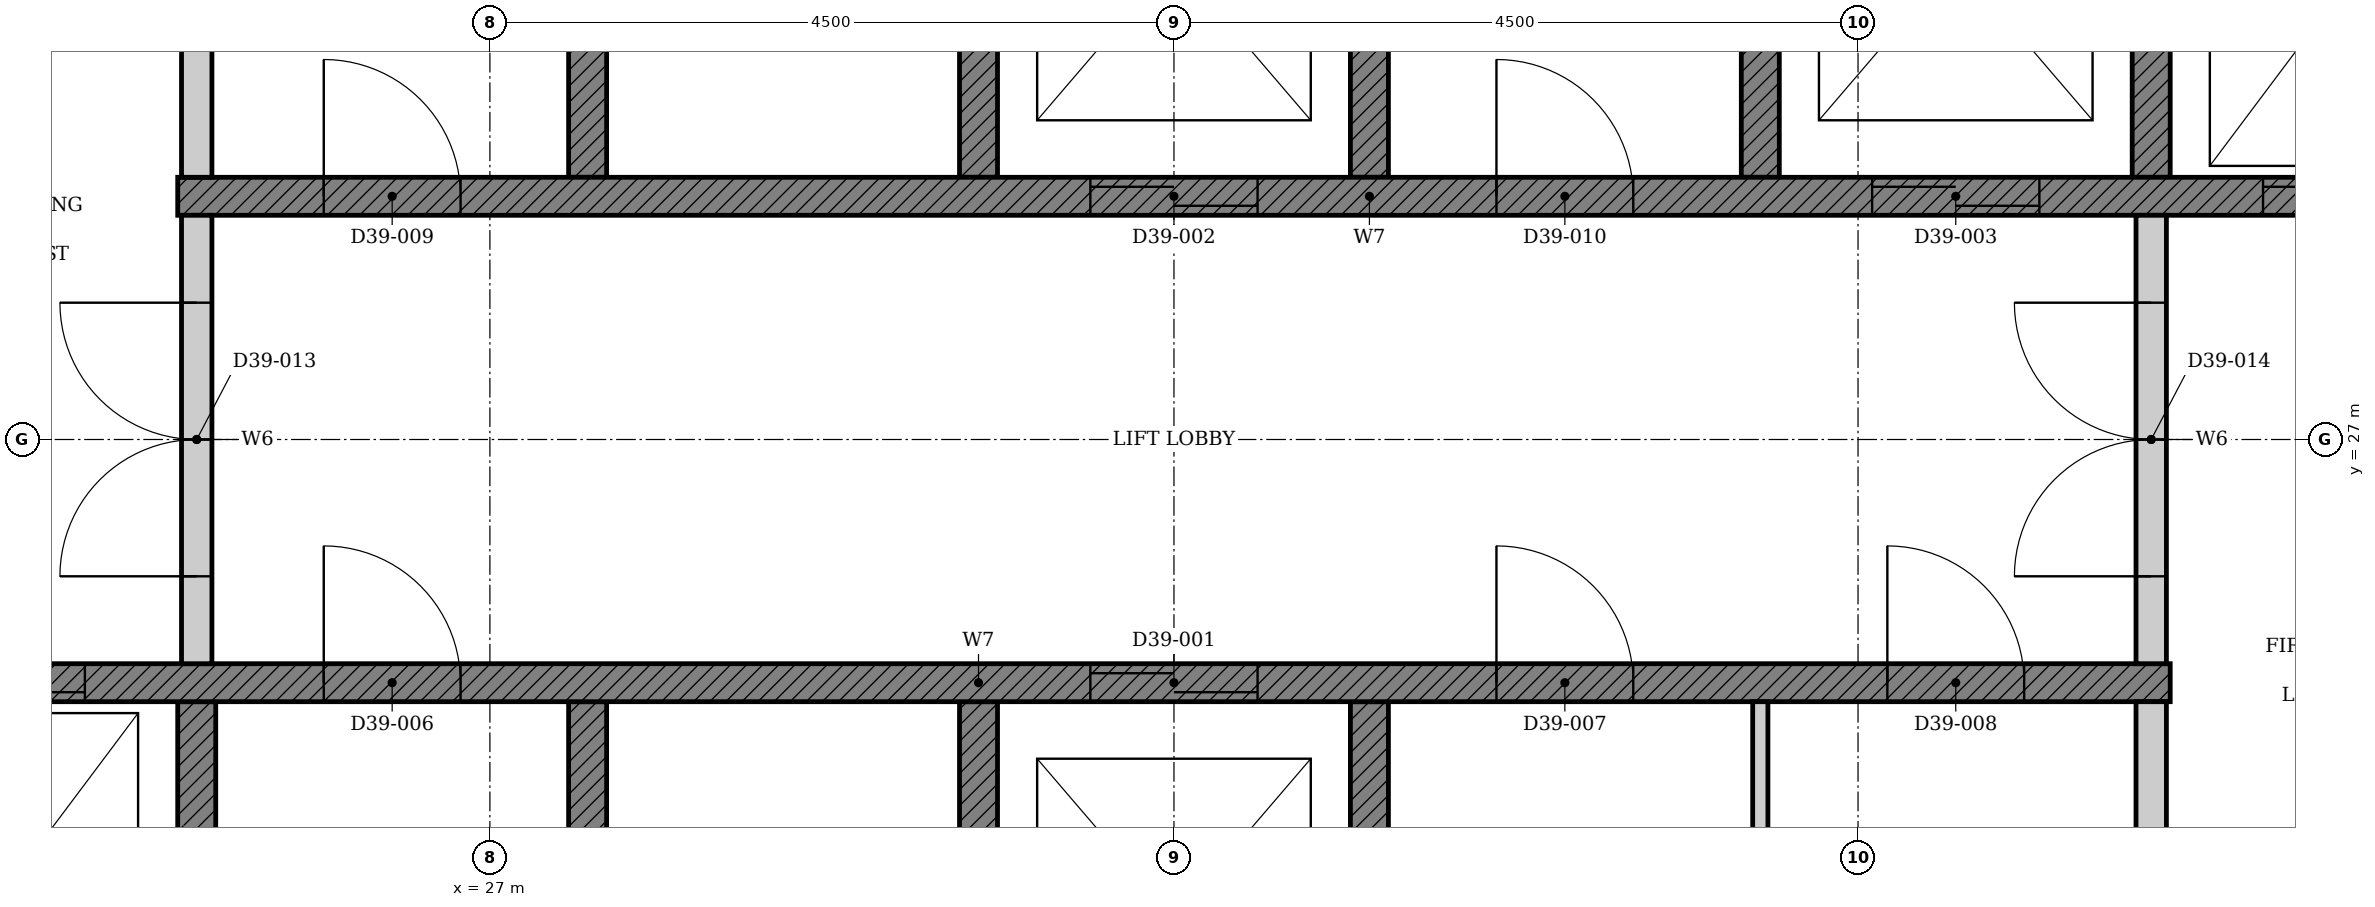
"""IFC4 building model, lengths in metres.
Left out: names, types, materials, properties, quantities, classifications, styles, units other than length and angle.
Written with IfcOpenShell. Run it as: python <this file> out.ifc"""

import sys

from ifc_helpers import new_model, si_unit, direction, frame, frame_2d, origin, place, context, subcontext, project, spatial, polyline, rectangle, outline, extrude, element, fill, save


model = new_model("IFC4")
c1 = context("Model", 3, precision=1e-05, world=origin(), true_north=direction((0.0, 1.0)))
c2 = subcontext(c1, "Body", "Model", "MODEL_VIEW")
j1 = project(units=[si_unit("LENGTHUNIT", "METRE"), si_unit("PLANEANGLEUNIT", "RADIAN")], contexts=[c1])
p1 = place(None, origin())
s1 = spatial("IfcSite", under=j1, at=p1, CompositionType="ELEMENT")
p2 = place(p1, origin())
s2 = spatial("IfcBuilding", under=s1, at=p2, CompositionType="ELEMENT")
p3 = place(p2, frame((0.0, 0.0, 158.0)))
s3 = spatial("IfcBuildingStorey", under=s2, at=p3, CompositionType="ELEMENT", Elevation=158.0)
p4 = place(p3, origin())
e1 = element("IfcWall", 1, at=p4, inside=s3, PredefinedType="SHEAR", context=c2, shape_type="SweptSolid", body=[
    extrude(outline(polyline([(22.375, 22.35), (25.197, 22.35), (25.197, 25.275), (24.947, 25.275), (24.947, 22.65), (22.625, 22.65), (22.625, 25.275), (22.375, 25.275), (22.375, 22.35)])), origin(), (0.0, 0.0, 1.0), 3.4),
])
p5 = place(p3, origin())
e2 = element("IfcWall", 2, at=p5, inside=s3, PredefinedType="SHEAR", context=c2, shape_type="SweptSolid", body=[
    extrude(outline(polyline([(27.518, 22.35), (32.911, 22.35), (32.911, 25.275), (32.661, 25.275), (32.661, 22.65), (30.339, 22.65), (30.339, 25.275), (30.089, 25.275), (30.089, 22.65), (27.768, 22.65), (27.768, 25.275), (27.518, 25.275), (27.518, 22.35)])), origin(), (0.0, 0.0, 1.0), 3.4),
])
p6 = place(p3, origin())
e3 = element("IfcWall", 3, at=p6, inside=s3, PredefinedType="SHEAR", context=c2, shape_type="SweptSolid", body=[
    extrude(outline(polyline([(27.518, 28.725), (27.768, 28.725), (27.768, 31.35), (30.089, 31.35), (30.089, 28.725), (30.339, 28.725), (30.339, 31.35), (32.661, 31.35), (32.661, 28.725), (32.911, 28.725), (32.911, 31.65), (27.518, 31.65), (27.518, 28.725)])), origin(), (0.0, 0.0, 1.0), 3.4),
])
p7 = place(p3, origin())
e4 = element("IfcWall", 4, at=p7, inside=s3, PredefinedType="SHEAR", context=c2, shape_type="SweptSolid", body=[
    extrude(outline(polyline([(35.232, 28.725), (35.482, 28.725), (35.482, 31.35), (37.803, 31.35), (37.803, 28.725), (38.053, 28.725), (38.053, 31.35), (40.375, 31.35), (40.375, 28.725), (40.625, 28.725), (40.625, 31.65), (35.232, 31.65), (35.232, 28.725)])), origin(), (0.0, 0.0, 1.0), 3.4),
])
p8 = place(p3, frame((22.375, 25.4, 0.0), z_axis=(0.0, 0.0, 1.0), x_axis=(1.0, 0.0, 0.0)))
e5 = element("IfcWall", 5, at=p8, inside=s3, PredefinedType="SHEAR", context=c2, shape_type="SweptSolid", body=[
    extrude(rectangle(XDim=15.678, YDim=0.25, at=frame_2d((7.839, 0.0))), origin(), (0.0, 0.0, 1.0), 3.4),
])
p9 = place(p8, frame((8.575, 0.0, 0.0)))
e6 = element("IfcOpeningElement", 6, at=p9, cuts=e5, PredefinedType="OPENING", context=c2, shape_type="SweptSolid", body=[
    extrude(rectangle(XDim=1.1, YDim=2.1, at=frame_2d((0.55, 1.05))), frame((0.0, 0.135, 0.0), z_axis=(0.0, -1.0, 0.0), x_axis=(1.0, 0.0, 0.0)), (0.0, 0.0, 1.0), 0.27),
])
p10 = place(p8, frame((0.861, 0.0, 0.0)))
e7 = element("IfcOpeningElement", 7, at=p10, cuts=e5, PredefinedType="OPENING", context=c2, shape_type="SweptSolid", body=[
    extrude(rectangle(XDim=1.1, YDim=2.1, at=frame_2d((0.55, 1.05))), frame((0.0, 0.135, 0.0), z_axis=(0.0, -1.0, 0.0), x_axis=(1.0, 0.0, 0.0)), (0.0, 0.0, 1.0), 0.27),
])
p11 = place(p8, frame((3.532, 0.0, 0.0)))
e8 = element("IfcOpeningElement", 8, at=p11, cuts=e5, PredefinedType="OPENING", context=c2, shape_type="SweptSolid", body=[
    extrude(rectangle(XDim=0.9, YDim=2.1, at=frame_2d((0.45, 1.05))), frame((0.0, 0.135, 0.0), z_axis=(0.0, -1.0, 0.0), x_axis=(1.0, 0.0, 0.0)), (0.0, 0.0, 1.0), 0.27),
])
p12 = place(p8, frame((11.246, 0.0, 0.0)))
e9 = element("IfcOpeningElement", 9, at=p12, cuts=e5, PredefinedType="OPENING", context=c2, shape_type="SweptSolid", body=[
    extrude(rectangle(XDim=0.9, YDim=2.1, at=frame_2d((0.45, 1.05))), frame((0.0, 0.135, 0.0), z_axis=(0.0, -1.0, 0.0), x_axis=(1.0, 0.0, 0.0)), (0.0, 0.0, 1.0), 0.27),
])
p13 = place(p8, frame((13.818, 0.0, 0.0)))
e10 = element("IfcOpeningElement", 10, at=p13, cuts=e5, PredefinedType="OPENING", context=c2, shape_type="SweptSolid", body=[
    extrude(rectangle(XDim=0.9, YDim=2.1, at=frame_2d((0.45, 1.05))), frame((0.0, 0.135, 0.0), z_axis=(0.0, -1.0, 0.0), x_axis=(1.0, 0.0, 0.0)), (0.0, 0.0, 1.0), 0.27),
])
p14 = place(p3, frame((24.947, 28.6, 0.0), z_axis=(0.0, 0.0, 1.0), x_axis=(1.0, 0.0, 0.0)))
e11 = element("IfcWall", 11, at=p14, inside=s3, PredefinedType="SHEAR", context=c2, shape_type="SweptSolid", body=[
    extrude(rectangle(XDim=15.678, YDim=0.25, at=frame_2d((7.839, 0.0))), origin(), (0.0, 0.0, 1.0), 3.4),
])
p15 = place(p14, frame((6.004, 0.0, 0.0)))
e12 = element("IfcOpeningElement", 12, at=p15, cuts=e11, PredefinedType="OPENING", context=c2, shape_type="SweptSolid", body=[
    extrude(rectangle(XDim=1.1, YDim=2.1, at=frame_2d((0.55, 1.05))), frame((0.0, 0.135, 0.0), z_axis=(0.0, -1.0, 0.0), x_axis=(1.0, 0.0, 0.0)), (0.0, 0.0, 1.0), 0.27),
])
p16 = place(p14, frame((11.146, 0.0, 0.0)))
e13 = element("IfcOpeningElement", 13, at=p16, cuts=e11, PredefinedType="OPENING", context=c2, shape_type="SweptSolid", body=[
    extrude(rectangle(XDim=1.1, YDim=2.1, at=frame_2d((0.55, 1.05))), frame((0.0, 0.135, 0.0), z_axis=(0.0, -1.0, 0.0), x_axis=(1.0, 0.0, 0.0)), (0.0, 0.0, 1.0), 0.27),
])
p17 = place(p14, frame((13.718, 0.0, 0.0)))
e14 = element("IfcOpeningElement", 14, at=p17, cuts=e11, PredefinedType="OPENING", context=c2, shape_type="SweptSolid", body=[
    extrude(rectangle(XDim=1.1, YDim=2.1, at=frame_2d((0.55, 1.05))), frame((0.0, 0.135, 0.0), z_axis=(0.0, -1.0, 0.0), x_axis=(1.0, 0.0, 0.0)), (0.0, 0.0, 1.0), 0.27),
])
p18 = place(p14, frame((0.961, 0.0, 0.0)))
e15 = element("IfcOpeningElement", 15, at=p18, cuts=e11, PredefinedType="OPENING", context=c2, shape_type="SweptSolid", body=[
    extrude(rectangle(XDim=0.9, YDim=2.1, at=frame_2d((0.45, 1.05))), frame((0.0, 0.135, 0.0), z_axis=(0.0, -1.0, 0.0), x_axis=(1.0, 0.0, 0.0)), (0.0, 0.0, 1.0), 0.27),
])
p19 = place(p14, frame((8.675, 0.0, 0.0)))
e16 = element("IfcOpeningElement", 16, at=p19, cuts=e11, PredefinedType="OPENING", context=c2, shape_type="SweptSolid", body=[
    extrude(rectangle(XDim=0.9, YDim=2.1, at=frame_2d((0.45, 1.05))), frame((0.0, 0.135, 0.0), z_axis=(0.0, -1.0, 0.0), x_axis=(1.0, 0.0, 0.0)), (0.0, 0.0, 1.0), 0.27),
])
p20 = place(p3, frame((37.928, 22.65, 0.0), z_axis=(0.0, 0.0, 1.0), x_axis=(0.0, 1.0, 0.0)))
e17 = element("IfcWall", 17, at=p20, inside=s3, PredefinedType="PARTITIONING", context=c2, shape_type="SweptSolid", body=[
    extrude(rectangle(XDim=2.625, YDim=0.2, at=frame_2d((1.312, 0.0))), origin(), (0.0, 0.0, 1.0), 3.4),
])
p21 = place(p3, frame((35.357, 22.65, 0.0), z_axis=(0.0, 0.0, 1.0), x_axis=(0.0, 1.0, 0.0)))
e18 = element("IfcWall", 18, at=p21, inside=s3, PredefinedType="PARTITIONING", context=c2, shape_type="SweptSolid", body=[
    extrude(rectangle(XDim=2.625, YDim=0.1, at=frame_2d((1.312, 0.0))), origin(), (0.0, 0.0, 1.0), 3.4),
])
p22 = place(p3, frame((25.072, 28.725, 0.0), z_axis=(0.0, 0.0, 1.0), x_axis=(0.0, 1.0, 0.0)))
e19 = element("IfcWall", 19, at=p22, inside=s3, PredefinedType="PARTITIONING", context=c2, shape_type="SweptSolid", body=[
    extrude(rectangle(XDim=2.625, YDim=0.2, at=frame_2d((1.312, 0.0))), origin(), (0.0, 0.0, 1.0), 3.4),
])
p23 = place(p3, frame((25.072, 25.525, 0.0), z_axis=(0.0, 0.0, 1.0), x_axis=(0.0, 1.0, 0.0)))
e20 = element("IfcWall", 20, at=p23, inside=s3, PredefinedType="PARTITIONING", context=c2, shape_type="SweptSolid", body=[
    extrude(rectangle(XDim=2.95, YDim=0.2, at=frame_2d((1.475, 0.0))), origin(), (0.0, 0.0, 1.0), 3.4),
])
p24 = place(p23, frame((0.575, 0.0, 0.0)))
e21 = element("IfcOpeningElement", 21, at=p24, cuts=e20, PredefinedType="OPENING", context=c2, shape_type="SweptSolid", body=[
    extrude(rectangle(XDim=1.8, YDim=2.1, at=frame_2d((0.9, 1.05))), frame((0.0, 0.11, 0.0), z_axis=(0.0, -1.0, 0.0), x_axis=(1.0, 0.0, 0.0)), (0.0, 0.0, 1.0), 0.22),
])
p25 = place(p3, frame((37.928, 25.525, 0.0), z_axis=(0.0, 0.0, 1.0), x_axis=(0.0, 1.0, 0.0)))
e22 = element("IfcWall", 22, at=p25, inside=s3, PredefinedType="PARTITIONING", context=c2, shape_type="SweptSolid", body=[
    extrude(rectangle(XDim=2.95, YDim=0.2, at=frame_2d((1.475, 0.0))), origin(), (0.0, 0.0, 1.0), 3.4),
])
p26 = place(p25, frame((0.575, 0.0, 0.0)))
e23 = element("IfcOpeningElement", 23, at=p26, cuts=e22, PredefinedType="OPENING", context=c2, shape_type="SweptSolid", body=[
    extrude(rectangle(XDim=1.8, YDim=2.1, at=frame_2d((0.9, 1.05))), frame((0.0, 0.11, 0.0), z_axis=(0.0, -1.0, 0.0), x_axis=(1.0, 0.0, 0.0)), (0.0, 0.0, 1.0), 0.22),
])
p27 = place(p9, origin())
e24 = element("IfcDoor", 24, at=p27, inside=s3, OperationType="DOUBLE_DOOR_SLIDING", PredefinedType="DOOR", context=c2, shape_type="SweptSolid", body=[
    extrude(rectangle(XDim=1.1, YDim=2.1, at=frame_2d((0.55, 1.05))), frame((0.0, 0.025, 0.0), z_axis=(0.0, -1.0, 0.0), x_axis=(1.0, 0.0, 0.0)), (0.0, 0.0, 1.0), 0.05),
])
fill(e6, e24)
p28 = place(p15, origin())
e25 = element("IfcDoor", 25, at=p28, inside=s3, OperationType="DOUBLE_DOOR_SLIDING", PredefinedType="DOOR", context=c2, shape_type="SweptSolid", body=[
    extrude(rectangle(XDim=1.1, YDim=2.1, at=frame_2d((0.55, 1.05))), frame((0.0, 0.025, 0.0), z_axis=(0.0, -1.0, 0.0), x_axis=(1.0, 0.0, 0.0)), (0.0, 0.0, 1.0), 0.05),
])
fill(e12, e25)
p29 = place(p16, origin())
e26 = element("IfcDoor", 26, at=p29, inside=s3, OperationType="DOUBLE_DOOR_SLIDING", PredefinedType="DOOR", context=c2, shape_type="SweptSolid", body=[
    extrude(rectangle(XDim=1.1, YDim=2.1, at=frame_2d((0.55, 1.05))), frame((0.0, 0.025, 0.0), z_axis=(0.0, -1.0, 0.0), x_axis=(1.0, 0.0, 0.0)), (0.0, 0.0, 1.0), 0.05),
])
fill(e13, e26)
p30 = place(p10, origin())
e27 = element("IfcDoor", 27, at=p30, inside=s3, OperationType="DOUBLE_DOOR_SLIDING", PredefinedType="DOOR", context=c2, shape_type="SweptSolid", body=[
    extrude(rectangle(XDim=1.1, YDim=2.1, at=frame_2d((0.55, 1.05))), frame((0.0, 0.025, 0.0), z_axis=(0.0, -1.0, 0.0), x_axis=(1.0, 0.0, 0.0)), (0.0, 0.0, 1.0), 0.05),
])
fill(e7, e27)
p31 = place(p17, origin())
e28 = element("IfcDoor", 28, at=p31, inside=s3, OperationType="DOUBLE_DOOR_SLIDING", PredefinedType="DOOR", context=c2, shape_type="SweptSolid", body=[
    extrude(rectangle(XDim=1.1, YDim=2.1, at=frame_2d((0.55, 1.05))), frame((0.0, 0.025, 0.0), z_axis=(0.0, -1.0, 0.0), x_axis=(1.0, 0.0, 0.0)), (0.0, 0.0, 1.0), 0.05),
])
fill(e14, e28)
p32 = place(p11, origin())
e29 = element("IfcDoor", 29, at=p32, inside=s3, OperationType="SINGLE_SWING_LEFT", PredefinedType="DOOR", context=c2, shape_type="SweptSolid", body=[
    extrude(rectangle(XDim=0.9, YDim=2.1, at=frame_2d((0.45, 1.05))), frame((0.0, 0.025, 0.0), z_axis=(0.0, -1.0, 0.0), x_axis=(1.0, 0.0, 0.0)), (0.0, 0.0, 1.0), 0.05),
])
fill(e8, e29)
p33 = place(p12, origin())
e30 = element("IfcDoor", 30, at=p33, inside=s3, OperationType="SINGLE_SWING_LEFT", PredefinedType="DOOR", context=c2, shape_type="SweptSolid", body=[
    extrude(rectangle(XDim=0.9, YDim=2.1, at=frame_2d((0.45, 1.05))), frame((0.0, 0.025, 0.0), z_axis=(0.0, -1.0, 0.0), x_axis=(1.0, 0.0, 0.0)), (0.0, 0.0, 1.0), 0.05),
])
fill(e9, e30)
p34 = place(p13, origin())
e31 = element("IfcDoor", 31, at=p34, inside=s3, OperationType="SINGLE_SWING_LEFT", PredefinedType="DOOR", context=c2, shape_type="SweptSolid", body=[
    extrude(rectangle(XDim=0.9, YDim=2.1, at=frame_2d((0.45, 1.05))), frame((0.0, 0.025, 0.0), z_axis=(0.0, -1.0, 0.0), x_axis=(1.0, 0.0, 0.0)), (0.0, 0.0, 1.0), 0.05),
])
fill(e10, e31)
p35 = place(p18, origin())
e32 = element("IfcDoor", 32, at=p35, inside=s3, OperationType="SINGLE_SWING_LEFT", PredefinedType="DOOR", context=c2, shape_type="SweptSolid", body=[
    extrude(rectangle(XDim=0.9, YDim=2.1, at=frame_2d((0.45, 1.05))), frame((0.0, 0.025, 0.0), z_axis=(0.0, -1.0, 0.0), x_axis=(1.0, 0.0, 0.0)), (0.0, 0.0, 1.0), 0.05),
])
fill(e15, e32)
p36 = place(p19, origin())
e33 = element("IfcDoor", 33, at=p36, inside=s3, OperationType="SINGLE_SWING_LEFT", PredefinedType="DOOR", context=c2, shape_type="SweptSolid", body=[
    extrude(rectangle(XDim=0.9, YDim=2.1, at=frame_2d((0.45, 1.05))), frame((0.0, 0.025, 0.0), z_axis=(0.0, -1.0, 0.0), x_axis=(1.0, 0.0, 0.0)), (0.0, 0.0, 1.0), 0.05),
])
fill(e16, e33)
p37 = place(p24, origin())
e34 = element("IfcDoor", 34, at=p37, inside=s3, OperationType="DOUBLE_DOOR_SINGLE_SWING", PredefinedType="DOOR", context=c2, shape_type="SweptSolid", body=[
    extrude(rectangle(XDim=1.8, YDim=2.1, at=frame_2d((0.9, 1.05))), frame((0.0, 0.025, 0.0), z_axis=(0.0, -1.0, 0.0), x_axis=(1.0, 0.0, 0.0)), (0.0, 0.0, 1.0), 0.05),
])
fill(e21, e34)
p38 = place(p26, origin())
e35 = element("IfcDoor", 35, at=p38, inside=s3, OperationType="DOUBLE_DOOR_SINGLE_SWING", PredefinedType="DOOR", context=c2, shape_type="SweptSolid", body=[
    extrude(rectangle(XDim=1.8, YDim=2.1, at=frame_2d((0.9, 1.05))), frame((0.0, 0.025, 0.0), z_axis=(0.0, -1.0, 0.0), x_axis=(1.0, 0.0, 0.0)), (0.0, 0.0, 1.0), 0.05),
])
fill(e23, e35)
save(model, sys.argv[1])
